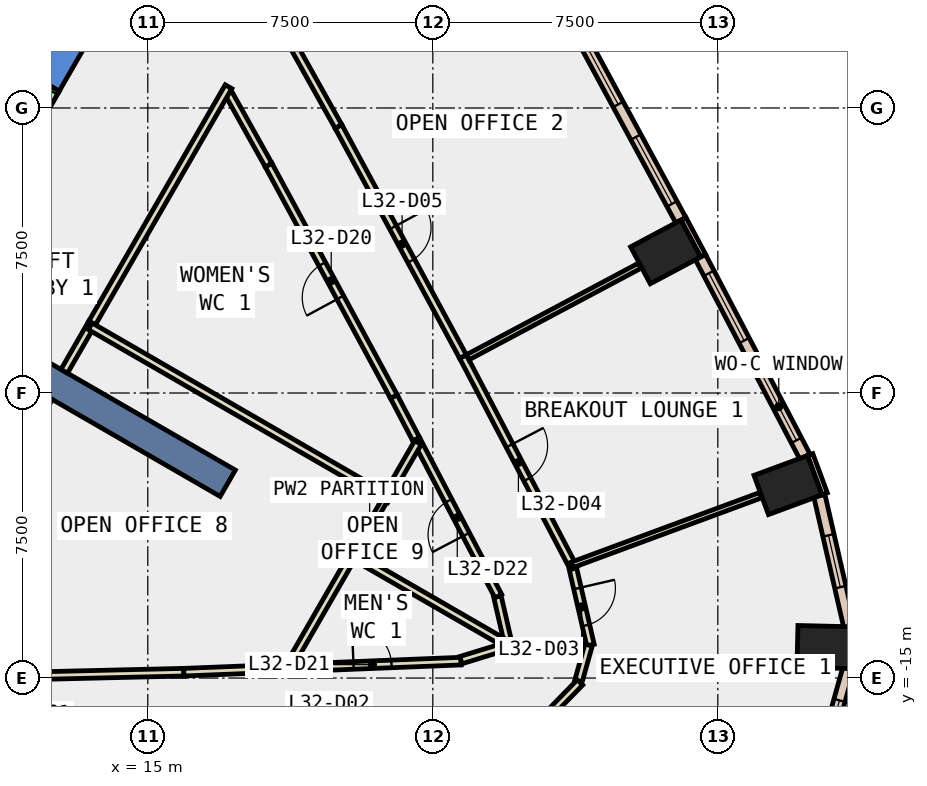
"""IFC4 building model, lengths in metres.
Left out: names, types, materials, properties, quantities, classifications, styles, units other than length and angle.
Written with IfcOpenShell. Run it as: python <this file> out.ifc"""

import sys

from ifc_helpers import new_model, si_unit, direction, frame, frame_2d, origin, origin_2d, place, context, subcontext, project, spatial, polyline, rectangle, outline, extrude, element, fill, save


model = new_model("IFC4")
c1 = context("Model", 3, precision=1e-05, world=origin(), true_north=direction((0.0, 1.0)))
c2 = subcontext(c1, "Body", "Model", "MODEL_VIEW")
j1 = project(units=[si_unit("LENGTHUNIT", "METRE"), si_unit("PLANEANGLEUNIT", "RADIAN")], contexts=[c1])
p1 = place(None, origin())
s1 = spatial("IfcSite", under=j1, at=p1, CompositionType="ELEMENT")
p2 = place(p1, origin())
s2 = spatial("IfcBuilding", under=s1, at=p2, CompositionType="ELEMENT")
p3 = place(p2, frame((0.0, 0.0, 146.6)))
s3 = spatial("IfcBuildingStorey", under=s2, at=p3, CompositionType="ELEMENT", Elevation=146.6)
for number, where, z_axis, x_axis in (
    (1, (32.845, -14.185, -0.4), (0.0, 0.0, 1.0), (0.024, 1.0, 0.0)),
    (2, (31.846, -9.923, -0.4), (0.0, 0.0, 1.0), (-0.347, 0.938, 0.0)),
    (3, (28.626, -3.788, -0.4), (0.0, 0.0, 1.0), (-0.47, 0.883, 0.0)),
):
    element("IfcColumn", number, at=place(p3, frame(where, z_axis=z_axis, x_axis=x_axis)), inside=s3, PredefinedType="COLUMN", context=c2, shape_type="SweptSolid", body=[
        extrude(rectangle(XDim=1.1, YDim=1.5, at=origin_2d()), origin(), (0.0, 0.0, 1.0), 4.2),
    ])
p4 = place(p3, frame((0.0, 0.0, -0.4)))
e4 = element("IfcWall", 4, at=p4, inside=s3, PredefinedType="SHEAR", context=c2, shape_type="SweptSolid", body=[
    extrude(outline(polyline([(11.974, 0.84), (12.667, 0.44), (13.856, 2.5), (12.933, 2.5), (11.974, 0.84)])), origin(), (0.0, 0.0, 1.0), 4.2),
])
p5 = place(p3, frame((0.0, 0.0, 3.6)))
e5 = element("IfcWall", 5, at=p5, inside=s3, PredefinedType="SHEAR", context=c2, shape_type="SweptSolid", body=[
    extrude(outline(polyline([(12.667, 0.44), (11.974, 0.84), (11.324, -0.286), (12.017, -0.686), (12.667, 0.44)])), origin(), (0.0, 0.0, 1.0), 0.2),
])
p6 = place(p3, frame((9.31, -5.375, -0.4), z_axis=(0.0, 0.0, 1.0), x_axis=(0.866017533419, -0.500013631625, 0.0)))
e6 = element("IfcWall", 6, at=p6, inside=s3, PredefinedType="SHEAR", context=c2, shape_type="SweptSolid", body=[
    extrude(rectangle(XDim=9.0, YDim=0.8, at=frame_2d((4.5, 0.0))), origin(), (0.0, 0.0, 1.0), 4.2),
])
for number, where, z_axis, x_axis in (
    (7, (32.81, -10.153, 0.0), (0.0, 0.0, 1.0), (-0.346, 0.938, 0.0)),
    (8, (29.612, -3.886, 0.0), (0.0, 0.0, 1.0), (-0.47, 0.883, 0.0)),
):
    element("IfcWall", number, at=place(p3, frame(where, z_axis=z_axis, x_axis=x_axis)), inside=s3, PredefinedType="STANDARD", context=c2, shape_type="SweptSolid", body=[
        extrude(rectangle(XDim=1.1, YDim=0.15, at=frame_2d((0.55, 0.0))), origin(), (0.0, 0.0, 1.0), 3.8),
    ])
p7 = place(p3, frame((32.587, -17.775, 0.0), z_axis=(0.0, 0.0, 1.0), x_axis=(0.270471130801, 0.962728085912, 0.0)))
e9 = element("IfcWall", 9, at=p7, inside=s3, PredefinedType="STANDARD", context=c2, shape_type="SweptSolid", body=[
    extrude(rectangle(XDim=3.143, YDim=0.3, at=frame_2d((1.572, 0.0))), origin(), (0.0, 0.0, 1.0), 3.8),
])
p8 = place(p7, frame((0.872, 0.0, 0.9)))
e10 = element("IfcOpeningElement", 10, at=p8, cuts=e9, PredefinedType="OPENING", context=c2, shape_type="SweptSolid", body=[
    extrude(rectangle(XDim=1.4, YDim=2.6, at=frame_2d((0.7, 1.3))), frame((0.0, 0.16, 0.0), z_axis=(0.0, -1.0, 0.0), x_axis=(1.0, 0.0, 0.0)), (0.0, 0.0, 1.0), 0.32),
])
p9 = place(p3, frame((33.463, -13.651, 0.0), z_axis=(0.0, 0.0, 1.0), x_axis=(-0.223538714932, 0.974695051247, 0.0)))
e11 = element("IfcWall", 11, at=p9, inside=s3, PredefinedType="STANDARD", context=c2, shape_type="SweptSolid", body=[
    extrude(rectangle(XDim=3.538, YDim=0.3, at=frame_2d((1.769, 0.0))), origin(), (0.0, 0.0, 1.0), 3.8),
])
p10 = place(p9, frame((1.069, 0.0, 0.9)))
e12 = element("IfcOpeningElement", 12, at=p10, cuts=e11, PredefinedType="OPENING", context=c2, shape_type="SweptSolid", body=[
    extrude(rectangle(XDim=1.4, YDim=2.6, at=frame_2d((0.7, 1.3))), frame((0.0, 0.16, 0.0), z_axis=(0.0, -1.0, 0.0), x_axis=(1.0, 0.0, 0.0)), (0.0, 0.0, 1.0), 0.32),
])
p11 = place(p3, frame((32.291, -9.173, 0.0), z_axis=(0.0, 0.0, 1.0), x_axis=(-0.463809970306, 0.885934710599, 0.0)))
e13 = element("IfcWall", 13, at=p11, inside=s3, PredefinedType="STANDARD", context=c2, shape_type="SweptSolid", body=[
    extrude(rectangle(XDim=5.927, YDim=0.3, at=frame_2d((2.963, 0.0))), origin(), (0.0, 0.0, 1.0), 3.8),
])
p12 = place(p11, frame((0.482, 0.0, 0.9)))
e14 = element("IfcOpeningElement", 14, at=p12, cuts=e13, PredefinedType="OPENING", context=c2, shape_type="SweptSolid", body=[
    extrude(rectangle(XDim=2.0, YDim=2.6, at=frame_2d((1.0, 1.3))), frame((0.0, 0.16, 0.0), z_axis=(0.0, -1.0, 0.0), x_axis=(1.0, 0.0, 0.0)), (0.0, 0.0, 1.0), 0.32),
])
p13 = place(p11, frame((3.445, 0.0, 0.9)))
e15 = element("IfcOpeningElement", 15, at=p13, cuts=e13, PredefinedType="OPENING", context=c2, shape_type="SweptSolid", body=[
    extrude(rectangle(XDim=2.0, YDim=2.6, at=frame_2d((1.0, 1.3))), frame((0.0, 0.16, 0.0), z_axis=(0.0, -1.0, 0.0), x_axis=(1.0, 0.0, 0.0)), (0.0, 0.0, 1.0), 0.32),
])
p14 = place(p3, frame((29.026, -2.953, 0.0), z_axis=(0.0, 0.0, 1.0), x_axis=(-0.475794135288, 0.87955667289, 0.0)))
e16 = element("IfcWall", 16, at=p14, inside=s3, PredefinedType="STANDARD", context=c2, shape_type="SweptSolid", body=[
    extrude(rectangle(XDim=5.952, YDim=0.3, at=frame_2d((2.976, 0.0))), origin(), (0.0, 0.0, 1.0), 3.8),
])
p15 = place(p14, frame((0.488, 0.0, 0.9)))
e17 = element("IfcOpeningElement", 17, at=p15, cuts=e16, PredefinedType="OPENING", context=c2, shape_type="SweptSolid", body=[
    extrude(rectangle(XDim=2.0, YDim=2.6, at=frame_2d((1.0, 1.3))), frame((0.0, 0.16, 0.0), z_axis=(0.0, -1.0, 0.0), x_axis=(1.0, 0.0, 0.0)), (0.0, 0.0, 1.0), 0.32),
])
p16 = place(p14, frame((3.464, 0.0, 0.9)))
e18 = element("IfcOpeningElement", 18, at=p16, cuts=e16, PredefinedType="OPENING", context=c2, shape_type="SweptSolid", body=[
    extrude(rectangle(XDim=2.0, YDim=2.6, at=frame_2d((1.0, 1.3))), frame((0.0, 0.16, 0.0), z_axis=(0.0, -1.0, 0.0), x_axis=(1.0, 0.0, 0.0)), (0.0, 0.0, 1.0), 0.32),
])
p17 = place(p3, frame((8.223, -15.029, 0.0), z_axis=(0.0, 0.0, 1.0), x_axis=(0.99971920994, 0.023696018186, 0.0)))
e19 = element("IfcWall", 19, at=p17, inside=s3, PredefinedType="PARTITIONING", context=c2, shape_type="SweptSolid", body=[
    extrude(rectangle(XDim=7.727, YDim=0.2, at=frame_2d((3.864, 0.0))), origin(), (0.0, 0.0, 1.0), 3.8),
])
p18 = place(p3, frame((15.948, -14.846, 0.0), z_axis=(0.0, 0.0, 1.0), x_axis=(0.999208477774, 0.039779617206, 0.0)))
e20 = element("IfcWall", 20, at=p18, inside=s3, PredefinedType="PARTITIONING", context=c2, shape_type="SweptSolid", body=[
    extrude(rectangle(XDim=2.639, YDim=0.2, at=frame_2d((1.32, 0.0))), origin(), (0.0, 0.0, 1.0), 3.8),
])
p19 = place(p3, frame((22.063, -8.717, 0.0), z_axis=(0.0, 0.0, 1.0), x_axis=(-0.463776683525, 0.885952136302, 0.0)))
e21 = element("IfcWall", 21, at=p19, inside=s3, PredefinedType="PARTITIONING", context=c2, shape_type="SweptSolid", body=[
    extrude(rectangle(XDim=1.268, YDim=0.2, at=frame_2d((0.634, 0.0))), origin(), (0.0, 0.0, 1.0), 3.8),
])
p20 = place(p3, frame((21.475, -7.594, 0.0), z_axis=(0.0, 0.0, 1.0), x_axis=(-0.475918691018, 0.879489283357, 0.0)))
e22 = element("IfcWall", 22, at=p20, inside=s3, PredefinedType="PARTITIONING", context=c2, shape_type="SweptSolid", body=[
    extrude(rectangle(XDim=6.928, YDim=0.2, at=frame_2d((3.464, 0.0))), origin(), (0.0, 0.0, 1.0), 3.8),
])
p21 = place(p20, frame((2.964, 0.0, 0.0)))
e23 = element("IfcOpeningElement", 23, at=p21, cuts=e22, PredefinedType="OPENING", context=c2, shape_type="SweptSolid", body=[
    extrude(rectangle(XDim=1.0, YDim=2.1, at=frame_2d((0.5, 1.05))), frame((0.0, 0.11, 0.0), z_axis=(0.0, -1.0, 0.0), x_axis=(1.0, 0.0, 0.0)), (0.0, 0.0, 1.0), 0.22),
])
p22 = place(p3, frame((18.178, -1.501, 0.0), z_axis=(0.0, 0.0, 1.0), x_axis=(-0.487980809747, 0.872854357449, 0.0)))
e24 = element("IfcWall", 24, at=p22, inside=s3, PredefinedType="PARTITIONING", context=c2, shape_type="SweptSolid", body=[
    extrude(rectangle(XDim=2.162, YDim=0.2, at=frame_2d((1.081, 0.0))), origin(), (0.0, 0.0, 1.0), 3.8),
])
p23 = place(p3, frame((18.585, -14.741, 0.0), z_axis=(0.0, 0.0, 1.0), x_axis=(0.99920304932, 0.039915739113, 0.0)))
e25 = element("IfcWall", 25, at=p23, inside=s3, PredefinedType="PARTITIONING", context=c2, shape_type="SweptSolid", body=[
    extrude(rectangle(XDim=4.661, YDim=0.2, at=frame_2d((2.33, 0.0))), origin(), (0.0, 0.0, 1.0), 3.8),
])
p24 = place(p23, frame((1.83, 0.0, 0.0)))
e26 = element("IfcOpeningElement", 26, at=p24, cuts=e25, PredefinedType="OPENING", context=c2, shape_type="SweptSolid", body=[
    extrude(rectangle(XDim=1.0, YDim=2.1, at=frame_2d((0.5, 1.05))), frame((0.0, 0.11, 0.0), z_axis=(0.0, -1.0, 0.0), x_axis=(1.0, 0.0, 0.0)), (0.0, 0.0, 1.0), 0.22),
])
p25 = place(p3, frame((23.238, -14.529, 0.0), z_axis=(0.0, 0.0, 1.0), x_axis=(0.956086269468, 0.293085389152, 0.0)))
e27 = element("IfcWall", 27, at=p25, inside=s3, PredefinedType="PARTITIONING", context=c2, shape_type="SweptSolid", body=[
    extrude(rectangle(XDim=1.252, YDim=0.2, at=frame_2d((0.626, 0.0))), origin(), (0.0, 0.0, 1.0), 3.8),
])
p26 = place(p3, frame((24.482, -14.081, 0.0), z_axis=(0.0, 0.0, 1.0), x_axis=(-0.223967203961, 0.974596681479, 0.0)))
e28 = element("IfcWall", 28, at=p26, inside=s3, PredefinedType="PARTITIONING", context=c2, shape_type="SweptSolid", body=[
    extrude(rectangle(XDim=1.259, YDim=0.2, at=frame_2d((0.629, 0.0))), origin(), (0.0, 0.0, 1.0), 3.8),
])
p27 = place(p3, frame((24.224, -12.845, 0.0), z_axis=(0.0, 0.0, 1.0), x_axis=(-0.463819025987, 0.885929969655, 0.0)))
e29 = element("IfcWall", 29, at=p27, inside=s3, PredefinedType="PARTITIONING", context=c2, shape_type="SweptSolid", body=[
    extrude(rectangle(XDim=4.659, YDim=0.2, at=frame_2d((2.33, 0.0))), origin(), (0.0, 0.0, 1.0), 3.8),
])
p28 = place(p27, frame((1.83, 0.0, 0.0)))
e30 = element("IfcOpeningElement", 30, at=p28, cuts=e29, PredefinedType="OPENING", context=c2, shape_type="SweptSolid", body=[
    extrude(rectangle(XDim=1.0, YDim=2.1, at=frame_2d((0.5, 1.05))), frame((0.0, 0.11, 0.0), z_axis=(0.0, -1.0, 0.0), x_axis=(1.0, 0.0, 0.0)), (0.0, 0.0, 1.0), 0.22),
])
p29 = place(p3, frame((26.186, -12.12, 0.0), z_axis=(0.0, 0.0, 1.0), x_axis=(0.224108401048, -0.974564222912, 0.0)))
e31 = element("IfcWall", 31, at=p29, inside=s3, PredefinedType="PARTITIONING", context=c2, shape_type="SweptSolid", body=[
    extrude(rectangle(XDim=2.065, YDim=0.2, at=frame_2d((1.033, 0.0))), origin(), (0.0, 0.0, 1.0), 3.8),
])
p30 = place(p29, frame((0.533, 0.0, 0.0)))
e32 = element("IfcOpeningElement", 32, at=p30, cuts=e31, PredefinedType="OPENING", context=c2, shape_type="SweptSolid", body=[
    extrude(rectangle(XDim=1.0, YDim=2.1, at=frame_2d((0.5, 1.05))), frame((0.0, 0.11, 0.0), z_axis=(0.0, -1.0, 0.0), x_axis=(1.0, 0.0, 0.0)), (0.0, 0.0, 1.0), 0.22),
])
p31 = place(p3, frame((26.599, -14.132, 0.0), z_axis=(0.0, 0.0, 1.0), x_axis=(-0.270631784819, -0.962682936925, 0.0)))
e33 = element("IfcWall", 33, at=p31, inside=s3, PredefinedType="PARTITIONING", context=c2, shape_type="SweptSolid", body=[
    extrude(rectangle(XDim=0.994, YDim=0.2, at=frame_2d((0.497, 0.0))), origin(), (0.0, 0.0, 1.0), 3.8),
])
p32 = place(p3, frame((26.373, -15.114, 0.0), z_axis=(0.0, 0.0, 1.0), x_axis=(-0.698272822523, -0.715831729756, 0.0)))
e34 = element("IfcWall", 34, at=p32, inside=s3, PredefinedType="PARTITIONING", context=c2, shape_type="SweptSolid", body=[
    extrude(rectangle(XDim=1.196, YDim=0.2, at=frame_2d((0.598, 0.0))), origin(), (0.0, 0.0, 1.0), 3.8),
])
p33 = place(p3, frame((23.294, -6.541, 0.0), z_axis=(0.0, 0.0, 1.0), x_axis=(0.463802391881, -0.885938678062, 0.0)))
e35 = element("IfcWall", 35, at=p33, inside=s3, PredefinedType="PARTITIONING", context=c2, shape_type="SweptSolid", body=[
    extrude(rectangle(XDim=6.287, YDim=0.2, at=frame_2d((3.144, 0.0))), origin(), (0.0, 0.0, 1.0), 3.8),
])
p34 = place(p33, frame((2.644, 0.0, 0.0)))
e36 = element("IfcOpeningElement", 36, at=p34, cuts=e35, PredefinedType="OPENING", context=c2, shape_type="SweptSolid", body=[
    extrude(rectangle(XDim=1.0, YDim=2.1, at=frame_2d((0.5, 1.05))), frame((0.0, 0.11, 0.0), z_axis=(0.0, -1.0, 0.0), x_axis=(1.0, 0.0, 0.0)), (0.0, 0.0, 1.0), 0.22),
])
p35 = place(p3, frame((18.358, 2.481, 0.0), z_axis=(0.0, 0.0, 1.0), x_axis=(0.48792588674, -0.872885060617, 0.0)))
e37 = element("IfcWall", 37, at=p35, inside=s3, PredefinedType="PARTITIONING", context=c2, shape_type="SweptSolid", body=[
    extrude(rectangle(XDim=3.403, YDim=0.2, at=frame_2d((1.701, 0.0))), origin(), (0.0, 0.0, 1.0), 3.8),
])
p36 = place(p3, frame((20.018, -0.489, 0.0), z_axis=(0.0, 0.0, 1.0), x_axis=(0.476025981828, -0.87943121654, 0.0)))
e38 = element("IfcWall", 38, at=p36, inside=s3, PredefinedType="PARTITIONING", context=c2, shape_type="SweptSolid", body=[
    extrude(rectangle(XDim=6.882, YDim=0.2, at=frame_2d((3.441, 0.0))), origin(), (0.0, 0.0, 1.0), 3.8),
])
p37 = place(p36, frame((3.016, 0.0, 0.0)))
e39 = element("IfcOpeningElement", 39, at=p37, cuts=e38, PredefinedType="OPENING", context=c2, shape_type="SweptSolid", body=[
    extrude(rectangle(XDim=1.0, YDim=2.1, at=frame_2d((0.5, 1.05))), frame((0.0, 0.11, 0.0), z_axis=(0.0, -1.0, 0.0), x_axis=(1.0, 0.0, 0.0)), (0.0, 0.0, 1.0), 0.22),
])
p38 = place(p3, frame((13.535, -5.657, 0.0), z_axis=(0.0, 0.0, 1.0), x_axis=(-0.499751238113, -0.866168978898, 0.0)))
e40 = element("IfcWall", 40, at=p38, inside=s3, PredefinedType="PARTITIONING", context=c2, shape_type="SweptSolid", body=[
    extrude(rectangle(XDim=1.469, YDim=0.2, at=frame_2d((0.734, 0.0))), origin(), (0.0, 0.0, 1.0), 3.8),
])
p39 = place(p3, frame((17.124, 0.56, 0.0), z_axis=(0.0, 0.0, 1.0), x_axis=(-0.49996876383, -0.866043437245, 0.0)))
e41 = element("IfcWall", 41, at=p39, inside=s3, PredefinedType="PARTITIONING", context=c2, shape_type="SweptSolid", body=[
    extrude(rectangle(XDim=7.179, YDim=0.2, at=frame_2d((3.589, 0.0))), origin(), (0.0, 0.0, 1.0), 3.8),
])
p40 = place(p3, frame((13.485, -5.744, 0.0), z_axis=(0.0, 0.0, 1.0), x_axis=(0.865950545648, -0.500129635687, 0.0)))
e42 = element("IfcWall", 42, at=p40, inside=s3, PredefinedType="PARTITIONING", context=c2, shape_type="SweptSolid", body=[
    extrude(rectangle(XDim=9.1, YDim=0.2, at=frame_2d((4.55, 0.0))), origin(), (0.0, 0.0, 1.0), 3.8),
])
p41 = place(p3, frame((20.347, -11.858, 0.0), z_axis=(0.0, 0.0, 1.0), x_axis=(-0.49990681678, -0.866079196458, 0.0)))
e43 = element("IfcWall", 43, at=p41, inside=s3, PredefinedType="PARTITIONING", context=c2, shape_type="SweptSolid", body=[
    extrude(rectangle(XDim=3.324, YDim=0.2, at=frame_2d((1.662, 0.0))), origin(), (0.0, 0.0, 1.0), 3.8),
])
p42 = place(p3, frame((21.228, -10.331, 0.0), z_axis=(0.0, 0.0, 1.0), x_axis=(-0.499920861661, -0.866071089505, 0.0)))
e44 = element("IfcWall", 44, at=p42, inside=s3, PredefinedType="PARTITIONING", context=c2, shape_type="SweptSolid", body=[
    extrude(rectangle(XDim=1.562, YDim=0.15, at=frame_2d((0.781, 0.0))), origin(), (0.0, 0.0, 1.0), 3.8),
])
p43 = place(p3, frame((22.109, -8.805, 0.0), z_axis=(0.0, 0.0, 1.0), x_axis=(-0.499920861661, -0.866071089505, 0.0)))
e45 = element("IfcWall", 45, at=p43, inside=s3, PredefinedType="PARTITIONING", context=c2, shape_type="SweptSolid", body=[
    extrude(rectangle(XDim=1.562, YDim=0.2, at=frame_2d((0.781, 0.0))), origin(), (0.0, 0.0, 1.0), 3.8),
])
p44 = place(p3, frame((20.31, -11.721, 0.0), z_axis=(0.0, 0.0, 1.0), x_axis=(0.86603399059, -0.499985126921, 0.0)))
e46 = element("IfcWall", 46, at=p44, inside=s3, PredefinedType="PARTITIONING", context=c2, shape_type="SweptSolid", body=[
    extrude(rectangle(XDim=4.854, YDim=0.2, at=frame_2d((2.427, 0.0))), origin(), (0.0, 0.0, 1.0), 3.8),
])
p45 = place(p3, frame((26.164, -12.023, 0.0), z_axis=(0.0, 0.0, 1.0), x_axis=(0.937995804261, 0.346646608505, 0.0)))
e47 = element("IfcWall", 47, at=p45, inside=s3, PredefinedType="PARTITIONING", context=c2, shape_type="SweptSolid", body=[
    extrude(rectangle(XDim=5.288, YDim=0.15, at=frame_2d((2.644, 0.0))), origin(), (0.0, 0.0, 1.0), 3.8),
])
p46 = place(p3, frame((23.417, -6.56, 0.0), z_axis=(0.0, 0.0, 1.0), x_axis=(0.882784638588, 0.469777906967, 0.0)))
e48 = element("IfcWall", 48, at=p46, inside=s3, PredefinedType="PARTITIONING", context=c2, shape_type="SweptSolid", body=[
    extrude(rectangle(XDim=5.13, YDim=0.15, at=frame_2d((2.565, 0.0))), origin(), (0.0, 0.0, 1.0), 3.8),
])
p47 = place(p3, frame((12.401, -7.621, 0.0), z_axis=(0.0, 0.0, 1.0), x_axis=(-0.499964151829, -0.866046099747, 0.0)))
e49 = element("IfcWall", 49, at=p47, inside=s3, PredefinedType="PARTITIONING", context=c2, shape_type="SweptSolid", body=[
    extrude(rectangle(XDim=8.656, YDim=0.2, at=frame_2d((4.328, 0.0))), origin(), (0.0, 0.0, 1.0), 3.8),
])
p48 = place(p47, frame((2.694, 0.0, 0.0)))
e50 = element("IfcOpeningElement", 50, at=p48, cuts=e49, PredefinedType="OPENING", context=c2, shape_type="SweptSolid", body=[
    extrude(rectangle(XDim=1.0, YDim=2.1, at=frame_2d((0.5, 1.05))), frame((0.0, 0.11, 0.0), z_axis=(0.0, -1.0, 0.0), x_axis=(1.0, 0.0, 0.0)), (0.0, 0.0, 1.0), 0.22),
])
p49 = place(p47, frame((3.794, 0.0, 0.0)))
e51 = element("IfcOpeningElement", 51, at=p49, cuts=e49, PredefinedType="OPENING", context=c2, shape_type="SweptSolid", body=[
    extrude(rectangle(XDim=1.0, YDim=2.1, at=frame_2d((0.5, 1.05))), frame((0.0, 0.11, 0.0), z_axis=(0.0, -1.0, 0.0), x_axis=(1.0, 0.0, 0.0)), (0.0, 0.0, 1.0), 0.22),
])
p50 = place(p3, frame((11.498, -0.385, 0.0), z_axis=(0.0, 0.0, 1.0), x_axis=(0.500221244143, 0.865897630733, 0.0)))
e52 = element("IfcWall", 52, at=p50, inside=s3, PredefinedType="STANDARD", context=c2, shape_type="SweptSolid", body=[
    extrude(rectangle(XDim=1.299, YDim=1.2, at=frame_2d((0.65, 0.0))), origin(), (0.0, 0.0, 1.0), 2.4),
])
p51 = place(p50, frame((0.1, 0.0, 0.0)))
e53 = element("IfcOpeningElement", 53, at=p51, cuts=e52, PredefinedType="OPENING", context=c2, shape_type="SweptSolid", body=[
    extrude(rectangle(XDim=1.1, YDim=2.3, at=frame_2d((0.55, 1.15))), frame((0.0, 0.61, 0.0), z_axis=(0.0, -1.0, 0.0), x_axis=(1.0, 0.0, 0.0)), (0.0, 0.0, 1.0), 1.22),
])
p52 = place(p8, origin())
e54 = element("IfcWindow", 54, at=p52, inside=s3, PartitioningType="SINGLE_PANEL", PredefinedType="WINDOW", context=c2, shape_type="SweptSolid", body=[
    extrude(rectangle(XDim=1.4, YDim=2.6, at=frame_2d((0.7, 1.3))), frame((0.0, 0.03, 0.0), z_axis=(0.0, -1.0, 0.0), x_axis=(1.0, 0.0, 0.0)), (0.0, 0.0, 1.0), 0.06),
])
fill(e10, e54)
p53 = place(p10, origin())
e55 = element("IfcWindow", 55, at=p53, inside=s3, PartitioningType="SINGLE_PANEL", PredefinedType="WINDOW", context=c2, shape_type="SweptSolid", body=[
    extrude(rectangle(XDim=1.4, YDim=2.6, at=frame_2d((0.7, 1.3))), frame((0.0, 0.03, 0.0), z_axis=(0.0, -1.0, 0.0), x_axis=(1.0, 0.0, 0.0)), (0.0, 0.0, 1.0), 0.06),
])
fill(e12, e55)
p54 = place(p12, origin())
e56 = element("IfcWindow", 56, at=p54, inside=s3, PartitioningType="SINGLE_PANEL", PredefinedType="WINDOW", context=c2, shape_type="SweptSolid", body=[
    extrude(rectangle(XDim=2.0, YDim=2.6, at=frame_2d((1.0, 1.3))), frame((0.0, 0.03, 0.0), z_axis=(0.0, -1.0, 0.0), x_axis=(1.0, 0.0, 0.0)), (0.0, 0.0, 1.0), 0.06),
])
fill(e14, e56)
p55 = place(p13, origin())
e57 = element("IfcWindow", 57, at=p55, inside=s3, PartitioningType="SINGLE_PANEL", PredefinedType="WINDOW", context=c2, shape_type="SweptSolid", body=[
    extrude(rectangle(XDim=2.0, YDim=2.6, at=frame_2d((1.0, 1.3))), frame((0.0, 0.03, 0.0), z_axis=(0.0, -1.0, 0.0), x_axis=(1.0, 0.0, 0.0)), (0.0, 0.0, 1.0), 0.06),
])
fill(e15, e57)
p56 = place(p15, origin())
e58 = element("IfcWindow", 58, at=p56, inside=s3, PartitioningType="SINGLE_PANEL", PredefinedType="WINDOW", context=c2, shape_type="SweptSolid", body=[
    extrude(rectangle(XDim=2.0, YDim=2.6, at=frame_2d((1.0, 1.3))), frame((0.0, 0.03, 0.0), z_axis=(0.0, -1.0, 0.0), x_axis=(1.0, 0.0, 0.0)), (0.0, 0.0, 1.0), 0.06),
])
fill(e17, e58)
p57 = place(p16, origin())
e59 = element("IfcWindow", 59, at=p57, inside=s3, PartitioningType="SINGLE_PANEL", PredefinedType="WINDOW", context=c2, shape_type="SweptSolid", body=[
    extrude(rectangle(XDim=2.0, YDim=2.6, at=frame_2d((1.0, 1.3))), frame((0.0, 0.03, 0.0), z_axis=(0.0, -1.0, 0.0), x_axis=(1.0, 0.0, 0.0)), (0.0, 0.0, 1.0), 0.06),
])
fill(e18, e59)
p58 = place(p30, origin())
e60 = element("IfcDoor", 60, at=p58, inside=s3, OperationType="SINGLE_SWING_LEFT", PredefinedType="DOOR", context=c2, shape_type="SweptSolid", body=[
    extrude(rectangle(XDim=1.0, YDim=2.1, at=frame_2d((0.5, 1.05))), frame((0.0, 0.025, 0.0), z_axis=(0.0, -1.0, 0.0), x_axis=(1.0, 0.0, 0.0)), (0.0, 0.0, 1.0), 0.05),
])
fill(e32, e60)
p59 = place(p34, origin())
e61 = element("IfcDoor", 61, at=p59, inside=s3, OperationType="SINGLE_SWING_LEFT", PredefinedType="DOOR", context=c2, shape_type="SweptSolid", body=[
    extrude(rectangle(XDim=1.0, YDim=2.1, at=frame_2d((0.5, 1.05))), frame((0.0, 0.025, 0.0), z_axis=(0.0, -1.0, 0.0), x_axis=(1.0, 0.0, 0.0)), (0.0, 0.0, 1.0), 0.05),
])
fill(e36, e61)
p60 = place(p37, origin())
e62 = element("IfcDoor", 62, at=p60, inside=s3, OperationType="SINGLE_SWING_LEFT", PredefinedType="DOOR", context=c2, shape_type="SweptSolid", body=[
    extrude(rectangle(XDim=1.0, YDim=2.1, at=frame_2d((0.5, 1.05))), frame((0.0, 0.025, 0.0), z_axis=(0.0, -1.0, 0.0), x_axis=(1.0, 0.0, 0.0)), (0.0, 0.0, 1.0), 0.05),
])
fill(e39, e62)
p61 = place(p21, origin())
e63 = element("IfcDoor", 63, at=p61, inside=s3, OperationType="SINGLE_SWING_LEFT", PredefinedType="DOOR", context=c2, shape_type="SweptSolid", body=[
    extrude(rectangle(XDim=1.0, YDim=2.1, at=frame_2d((0.5, 1.05))), frame((0.0, 0.025, 0.0), z_axis=(0.0, -1.0, 0.0), x_axis=(1.0, 0.0, 0.0)), (0.0, 0.0, 1.0), 0.05),
])
fill(e23, e63)
p62 = place(p24, origin())
e64 = element("IfcDoor", 64, at=p62, inside=s3, OperationType="SINGLE_SWING_LEFT", PredefinedType="DOOR", context=c2, shape_type="SweptSolid", body=[
    extrude(rectangle(XDim=1.0, YDim=2.1, at=frame_2d((0.5, 1.05))), frame((0.0, 0.025, 0.0), z_axis=(0.0, -1.0, 0.0), x_axis=(1.0, 0.0, 0.0)), (0.0, 0.0, 1.0), 0.05),
])
fill(e26, e64)
p63 = place(p28, origin())
e65 = element("IfcDoor", 65, at=p63, inside=s3, OperationType="SINGLE_SWING_LEFT", PredefinedType="DOOR", context=c2, shape_type="SweptSolid", body=[
    extrude(rectangle(XDim=1.0, YDim=2.1, at=frame_2d((0.5, 1.05))), frame((0.0, 0.025, 0.0), z_axis=(0.0, -1.0, 0.0), x_axis=(1.0, 0.0, 0.0)), (0.0, 0.0, 1.0), 0.05),
])
fill(e30, e65)
save(model, sys.argv[1])
